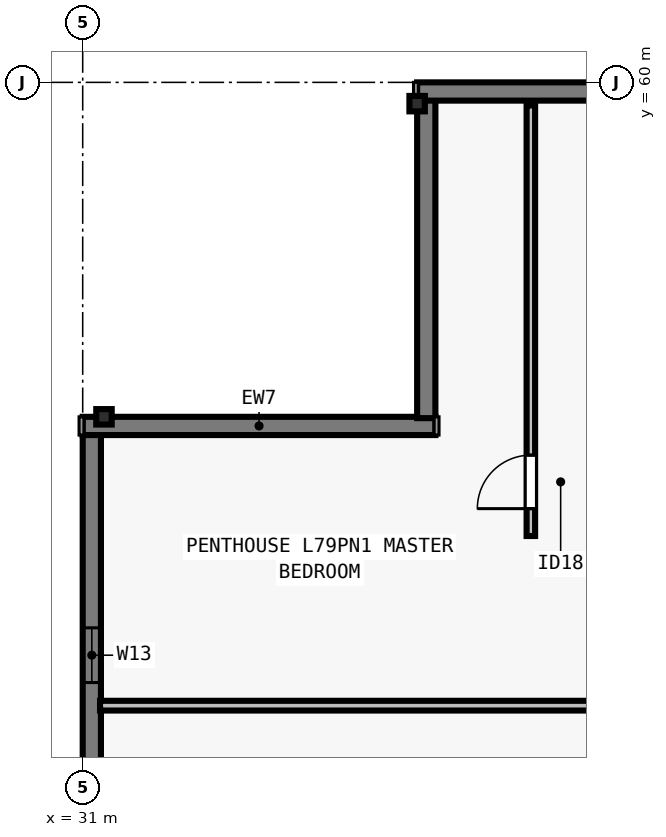
"""IFC4 building model, lengths in metres.
Left out: names, types, materials, properties, quantities, classifications, styles, units other than length and angle.
Written with IfcOpenShell. Run it as: python <this file> out.ifc"""

import sys

from ifc_helpers import new_model, si_unit, direction, frame, frame_2d, origin, origin_2d, place, context, subcontext, project, spatial, rectangle, i_section, extrude, element, fill, save


model = new_model("IFC4")
c1 = context("Model", 3, precision=1e-05, world=origin(), true_north=direction((0.0, 1.0)))
c2 = subcontext(c1, "Body", "Model", "MODEL_VIEW")
j1 = project(units=[si_unit("LENGTHUNIT", "METRE"), si_unit("PLANEANGLEUNIT", "RADIAN")], contexts=[c1])
p1 = place(None, origin())
s1 = spatial("IfcSite", under=j1, at=p1, CompositionType="ELEMENT")
p2 = place(p1, origin())
s2 = spatial("IfcBuilding", under=s1, at=p2, CompositionType="ELEMENT")
p3 = place(p2, frame((0.0, 0.0, 287.5)))
s3 = spatial("IfcBuildingStorey", under=s2, at=p3, CompositionType="ELEMENT", Elevation=287.5)
for number, where, z_axis, x_axis in (
    (1, (36.5, 59.65, 0.0), (0.0, 0.0, 1.0), (1.0, 0.0, 0.0)),
    (2, (31.35, 54.5, 0.0), (0.0, 0.0, 1.0), (0.0, 1.0, 0.0)),
):
    element("IfcColumn", number, at=place(p3, frame(where, z_axis=z_axis, x_axis=x_axis)), inside=s3, PredefinedType="COLUMN", context=c2, shape_type="SweptSolid", body=[
        extrude(i_section(OverallWidth=0.254, OverallDepth=0.254, WebThickness=0.009, FlangeThickness=0.014, FilletRadius=0.013, at=origin_2d()), origin(), (0.0, 0.0, 1.0), 3.5),
    ])
p4 = place(p3, frame((31.15, 23.5, 0.0), z_axis=(0.0, 0.0, 1.0), x_axis=(0.0, 1.0, 0.0)))
e3 = element("IfcWall", 3, at=p4, inside=s3, PredefinedType="SOLIDWALL", context=c2, shape_type="SweptSolid", body=[
    extrude(rectangle(XDim=30.722, YDim=0.3, at=frame_2d((15.361, 0.0))), origin(), (0.0, 0.0, 1.0), 3.29),
])
p5 = place(p4, frame((8.331, 0.0, 0.8)))
e4 = element("IfcOpeningElement", 4, at=p5, cuts=e3, PredefinedType="OPENING", context=c2, shape_type="SweptSolid", body=[
    extrude(rectangle(XDim=1.65, YDim=1.758, at=frame_2d((0.825, 0.879))), frame((0.0, 0.16, 0.0), z_axis=(0.0, -1.0, 0.0), x_axis=(1.0, 0.0, 0.0)), (0.0, 0.0, 1.0), 0.32),
])
p6 = place(p4, frame((12.442, 0.0, 0.8)))
e5 = element("IfcOpeningElement", 5, at=p6, cuts=e3, PredefinedType="OPENING", context=c2, shape_type="SweptSolid", body=[
    extrude(rectangle(XDim=2.0, YDim=1.758, at=frame_2d((1.0, 0.879))), frame((0.0, 0.16, 0.0), z_axis=(0.0, -1.0, 0.0), x_axis=(1.0, 0.0, 0.0)), (0.0, 0.0, 1.0), 0.32),
])
p7 = place(p4, frame((17.304, 0.0, 0.8)))
e6 = element("IfcOpeningElement", 6, at=p7, cuts=e3, PredefinedType="OPENING", context=c2, shape_type="SweptSolid", body=[
    extrude(rectangle(XDim=1.65, YDim=1.758, at=frame_2d((0.825, 0.879))), frame((0.0, 0.16, 0.0), z_axis=(0.0, -1.0, 0.0), x_axis=(1.0, 0.0, 0.0)), (0.0, 0.0, 1.0), 0.32),
])
p8 = place(p4, frame((20.967, 0.0, 0.8)))
e7 = element("IfcOpeningElement", 7, at=p8, cuts=e3, PredefinedType="OPENING", context=c2, shape_type="SweptSolid", body=[
    extrude(rectangle(XDim=2.0, YDim=1.758, at=frame_2d((1.0, 0.879))), frame((0.0, 0.16, 0.0), z_axis=(0.0, -1.0, 0.0), x_axis=(1.0, 0.0, 0.0)), (0.0, 0.0, 1.0), 0.32),
])
p9 = place(p4, frame((26.63, 0.0, 0.8)))
e8 = element("IfcOpeningElement", 8, at=p9, cuts=e3, PredefinedType="OPENING", context=c2, shape_type="SweptSolid", body=[
    extrude(rectangle(XDim=0.9, YDim=1.75, at=frame_2d((0.45, 0.875))), frame((0.0, 0.16, 0.0), z_axis=(0.0, -1.0, 0.0), x_axis=(1.0, 0.0, 0.0)), (0.0, 0.0, 1.0), 0.32),
])
p10 = place(p3, frame((31.0, 54.35, 0.0), z_axis=(0.0, 0.0, 1.0), x_axis=(1.0, 0.0, 0.0)))
e9 = element("IfcWall", 9, at=p10, inside=s3, PredefinedType="SOLIDWALL", context=c2, shape_type="SweptSolid", body=[
    extrude(rectangle(XDim=5.8, YDim=0.3, at=frame_2d((2.9, 0.0))), origin(), (0.0, 0.0, 1.0), 3.29),
])
p11 = place(p3, frame((36.65, 54.478, 0.0), z_axis=(0.0, 0.0, 1.0), x_axis=(0.0, 1.0, 0.0)))
e10 = element("IfcWall", 10, at=p11, inside=s3, PredefinedType="SOLIDWALL", context=c2, shape_type="SweptSolid", body=[
    extrude(rectangle(XDim=5.244, YDim=0.3, at=frame_2d((2.622, 0.0))), origin(), (0.0, 0.0, 1.0), 3.29),
])
p12 = place(p3, frame((36.5, 59.85, 0.0), z_axis=(0.0, 0.0, 1.0), x_axis=(1.0, 0.0, 0.0)))
e11 = element("IfcWall", 11, at=p12, inside=s3, PredefinedType="SOLIDWALL", context=c2, shape_type="SweptSolid", body=[
    extrude(rectangle(XDim=30.722, YDim=0.3, at=frame_2d((15.361, 0.0))), origin(), (0.0, 0.0, 1.0), 3.29),
])
p13 = place(p12, frame((4.769, 0.0, 0.8)))
e12 = element("IfcOpeningElement", 12, at=p13, cuts=e11, PredefinedType="OPENING", context=c2, shape_type="SweptSolid", body=[
    extrude(rectangle(XDim=2.0, YDim=1.758, at=frame_2d((1.0, 0.879))), frame((0.0, 0.16, 0.0), z_axis=(0.0, -1.0, 0.0), x_axis=(1.0, 0.0, 0.0)), (0.0, 0.0, 1.0), 0.32),
])
p14 = place(p12, frame((8.331, 0.0, 0.8)))
e13 = element("IfcOpeningElement", 13, at=p14, cuts=e11, PredefinedType="OPENING", context=c2, shape_type="SweptSolid", body=[
    extrude(rectangle(XDim=1.65, YDim=1.758, at=frame_2d((0.825, 0.879))), frame((0.0, 0.16, 0.0), z_axis=(0.0, -1.0, 0.0), x_axis=(1.0, 0.0, 0.0)), (0.0, 0.0, 1.0), 0.32),
])
p15 = place(p12, frame((12.442, 0.0, 0.8)))
e14 = element("IfcOpeningElement", 14, at=p15, cuts=e11, PredefinedType="OPENING", context=c2, shape_type="SweptSolid", body=[
    extrude(rectangle(XDim=2.0, YDim=1.758, at=frame_2d((1.0, 0.879))), frame((0.0, 0.16, 0.0), z_axis=(0.0, -1.0, 0.0), x_axis=(1.0, 0.0, 0.0)), (0.0, 0.0, 1.0), 0.32),
])
p16 = place(p12, frame((17.304, 0.0, 0.8)))
e15 = element("IfcOpeningElement", 15, at=p16, cuts=e11, PredefinedType="OPENING", context=c2, shape_type="SweptSolid", body=[
    extrude(rectangle(XDim=1.65, YDim=1.758, at=frame_2d((0.825, 0.879))), frame((0.0, 0.16, 0.0), z_axis=(0.0, -1.0, 0.0), x_axis=(1.0, 0.0, 0.0)), (0.0, 0.0, 1.0), 0.32),
])
p17 = place(p12, frame((24.128, 0.0, 0.8)))
e16 = element("IfcOpeningElement", 16, at=p17, cuts=e11, PredefinedType="OPENING", context=c2, shape_type="SweptSolid", body=[
    extrude(rectangle(XDim=1.65, YDim=1.758, at=frame_2d((0.825, 0.879))), frame((0.0, 0.16, 0.0), z_axis=(0.0, -1.0, 0.0), x_axis=(1.0, 0.0, 0.0)), (0.0, 0.0, 1.0), 0.32),
])
p18 = place(p3, frame((31.285, 49.75, 0.0), z_axis=(0.0, 0.0, 1.0), x_axis=(1.0, 0.0, 0.0)))
e17 = element("IfcWall", 17, at=p18, inside=s3, PredefinedType="PARTITIONING", context=c2, shape_type="SweptSolid", body=[
    extrude(rectangle(XDim=41.43, YDim=0.16, at=frame_2d((20.715, 0.0))), origin(), (0.0, 0.0, 1.0), 3.009),
])
p19 = place(p18, frame((20.235, 0.0, 0.0)))
e18 = element("IfcOpeningElement", 18, at=p19, cuts=e17, PredefinedType="OPENING", context=c2, shape_type="SweptSolid", body=[
    extrude(rectangle(XDim=0.96, YDim=2.18, at=frame_2d((0.48, 1.09))), frame((0.0, 0.09, 0.0), z_axis=(0.0, -1.0, 0.0), x_axis=(1.0, 0.0, 0.0)), (0.0, 0.0, 1.0), 0.18),
])
p20 = place(p3, frame((38.37, 52.54, 0.0), z_axis=(0.0, 0.0, 1.0), x_axis=(0.0, 1.0, 0.0)))
e19 = element("IfcWall", 19, at=p20, inside=s3, PredefinedType="PARTITIONING", context=c2, shape_type="SweptSolid", body=[
    extrude(rectangle(XDim=7.08, YDim=0.14, at=frame_2d((3.54, 0.0))), origin(), (0.0, 0.0, 1.0), 2.653),
])
p21 = place(p20, frame((0.45, 0.0, 0.0)))
e20 = element("IfcOpeningElement", 20, at=p21, cuts=e19, PredefinedType="OPENING", context=c2, shape_type="SweptSolid", body=[
    extrude(rectangle(XDim=0.88, YDim=2.1, at=frame_2d((0.44, 1.05))), frame((0.0, 0.08, 0.0), z_axis=(0.0, -1.0, 0.0), x_axis=(1.0, 0.0, 0.0)), (0.0, 0.0, 1.0), 0.16),
])
p22 = place(p9, origin())
e21 = element("IfcWindow", 21, at=p22, inside=s3, PartitioningType="SINGLE_PANEL", PredefinedType="WINDOW", context=c2, shape_type="SweptSolid", body=[
    extrude(rectangle(XDim=0.9, YDim=1.75, at=frame_2d((0.45, 0.875))), frame((0.0, -0.04, 0.0), z_axis=(0.0, -1.0, 0.0), x_axis=(1.0, 0.0, 0.0)), (0.0, 0.0, 1.0), 0.06),
])
fill(e8, e21)
p23 = place(p21, origin())
e22 = element("IfcDoor", 22, at=p23, inside=s3, OperationType="SINGLE_SWING_LEFT", PredefinedType="DOOR", context=c2, shape_type="SweptSolid", body=[
    extrude(rectangle(XDim=0.88, YDim=2.1, at=frame_2d((0.44, 1.05))), frame((0.0, 0.025, 0.0), z_axis=(0.0, -1.0, 0.0), x_axis=(1.0, 0.0, 0.0)), (0.0, 0.0, 1.0), 0.05),
])
fill(e20, e22)
save(model, sys.argv[1])
